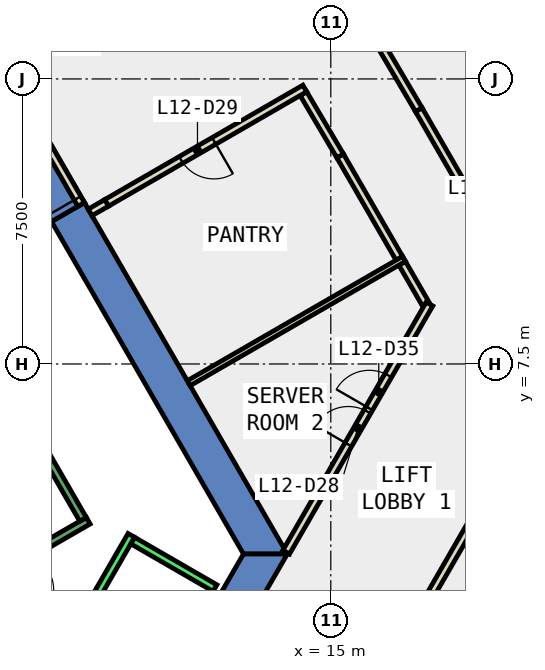
"""IFC4 building model, lengths in metres.
Left out: names, types, materials, properties, quantities, classifications, styles, units other than length and angle.
Written with IfcOpenShell. Run it as: python <this file> out.ifc"""

import sys

from ifc_helpers import new_model, si_unit, direction, frame, frame_2d, origin, place, context, subcontext, project, spatial, polyline, rectangle, outline, extrude, element, fill, save


model = new_model("IFC4")
c1 = context("Model", 3, precision=1e-05, world=origin(), true_north=direction((0.0, 1.0)))
c2 = subcontext(c1, "Body", "Model", "MODEL_VIEW")
j1 = project(units=[si_unit("LENGTHUNIT", "METRE"), si_unit("PLANEANGLEUNIT", "RADIAN")], contexts=[c1])
p1 = place(None, origin())
s1 = spatial("IfcSite", under=j1, at=p1, CompositionType="ELEMENT")
p2 = place(p1, origin())
s2 = spatial("IfcBuilding", under=s1, at=p2, CompositionType="ELEMENT")
p3 = place(p2, frame((0.0, 0.0, 60.2)))
s3 = spatial("IfcBuildingStorey", under=s2, at=p3, CompositionType="ELEMENT", Elevation=60.2)
p4 = place(p3, frame((0.0, 0.0, -0.4)))
e1 = element("IfcWall", 1, at=p4, inside=s3, PredefinedType="SHEAR", context=c2, shape_type="SweptSolid", body=[
    extrude(outline(polyline([(8.517, 11.748), (7.651, 11.248), (12.702, 2.5), (13.856, 2.5), (8.517, 11.748)])), origin(), (0.0, 0.0, 1.0), 4.2),
])
p5 = place(p3, frame((0.0, 0.0, 3.6)))
e2 = element("IfcWall", 2, at=p5, inside=s3, PredefinedType="SHEAR", context=c2, shape_type="SweptSolid", body=[
    extrude(outline(polyline([(7.517, 13.48), (6.651, 12.98), (7.651, 11.248), (8.517, 11.748), (7.517, 13.48)])), origin(), (0.0, 0.0, 1.0), 0.2),
])
p6 = place(p3, frame((0.0, 0.0, -0.4)))
e3 = element("IfcWall", 3, at=p6, inside=s3, PredefinedType="SHEAR", context=c2, shape_type="SweptSolid", body=[
    extrude(outline(polyline([(11.801, 0.94), (12.667, 0.44), (13.856, 2.5), (12.702, 2.5), (11.801, 0.94)])), origin(), (0.0, 0.0, 1.0), 4.2),
])
p7 = place(p3, frame((17.497, 9.078, 0.0), z_axis=(0.0, 0.0, 1.0), x_axis=(-0.500126451326, 0.865952384768, 0.0)))
e4 = element("IfcWall", 4, at=p7, inside=s3, PredefinedType="PARTITIONING", context=c2, shape_type="SweptSolid", body=[
    extrude(rectangle(XDim=1.238, YDim=0.2, at=frame_2d((0.619, 0.0))), origin(), (0.0, 0.0, 1.0), 3.8),
])
p8 = place(p3, frame((16.803, 10.28, 0.0), z_axis=(0.0, 0.0, 1.0), x_axis=(-0.499941881293, 0.866058956036, 0.0)))
e5 = element("IfcWall", 5, at=p8, inside=s3, PredefinedType="PARTITIONING", context=c2, shape_type="SweptSolid", body=[
    extrude(rectangle(XDim=3.114, YDim=0.2, at=frame_2d((1.557, 0.0))), origin(), (0.0, 0.0, 1.0), 3.8),
])
p9 = place(p3, frame((15.246, 12.977, 0.0), z_axis=(0.0, 0.0, 1.0), x_axis=(-0.508473864329, 0.861077423519, 0.0)))
e6 = element("IfcWall", 6, at=p9, inside=s3, PredefinedType="PARTITIONING", context=c2, shape_type="SweptSolid", body=[
    extrude(rectangle(XDim=1.9, YDim=0.2, at=frame_2d((0.95, 0.0))), origin(), (0.0, 0.0, 1.0), 3.8),
])
p10 = place(p3, frame((14.316, 14.75, 0.0), z_axis=(0.0, 0.0, 1.0), x_axis=(-0.865981716183, -0.500075661512, 0.0)))
e7 = element("IfcWall", 7, at=p10, inside=s3, PredefinedType="PARTITIONING", context=c2, shape_type="SweptSolid", body=[
    extrude(rectangle(XDim=6.023, YDim=0.2, at=frame_2d((3.011, 0.0))), origin(), (0.0, 0.0, 1.0), 3.8),
])
p11 = place(p10, frame((2.761, 0.0, 0.0)))
e8 = element("IfcOpeningElement", 8, at=p11, cuts=e7, PredefinedType="OPENING", context=c2, shape_type="SweptSolid", body=[
    extrude(rectangle(XDim=1.0, YDim=2.1, at=frame_2d((0.5, 1.05))), frame((0.0, 0.11, 0.0), z_axis=(0.0, -1.0, 0.0), x_axis=(1.0, 0.0, 0.0)), (0.0, 0.0, 1.0), 0.22),
])
p12 = place(p3, frame((15.512, 17.248, 0.0), z_axis=(0.0, 0.0, 1.0), x_axis=(0.508178415101, -0.861251820564, 0.0)))
e9 = element("IfcWall", 9, at=p12, inside=s3, PredefinedType="PARTITIONING", context=c2, shape_type="SweptSolid", body=[
    extrude(rectangle(XDim=3.554, YDim=0.2, at=frame_2d((1.777, 0.0))), origin(), (0.0, 0.0, 1.0), 3.8),
])
p13 = place(p3, frame((17.318, 14.187, 0.0), z_axis=(0.0, 0.0, 1.0), x_axis=(0.499986381413, -0.866033266336, 0.0)))
e10 = element("IfcWall", 10, at=p13, inside=s3, PredefinedType="PARTITIONING", context=c2, shape_type="SweptSolid", body=[
    extrude(rectangle(XDim=7.18, YDim=0.2, at=frame_2d((3.59, 0.0))), origin(), (0.0, 0.0, 1.0), 3.8),
])
p14 = place(p13, frame((3.165, 0.0, 0.0)))
e11 = element("IfcOpeningElement", 11, at=p14, cuts=e10, PredefinedType="OPENING", context=c2, shape_type="SweptSolid", body=[
    extrude(rectangle(XDim=1.0, YDim=2.1, at=frame_2d((0.5, 1.05))), frame((0.0, 0.11, 0.0), z_axis=(0.0, -1.0, 0.0), x_axis=(1.0, 0.0, 0.0)), (0.0, 0.0, 1.0), 0.22),
])
p15 = place(p3, frame((6.25, 1.894, 0.0), z_axis=(0.0, 0.0, 1.0), x_axis=(0.866043184279, -0.499969202016, 0.0)))
e12 = element("IfcWall", 12, at=p15, inside=s3, PredefinedType="PARTITIONING", context=c2, shape_type="SweptSolid", body=[
    extrude(rectangle(XDim=2.084, YDim=0.2, at=frame_2d((1.042, 0.0))), origin(), (0.0, 0.0, 1.0), 3.8),
])
p16 = place(p15, frame((0.642, 0.0, 0.0)))
e13 = element("IfcOpeningElement", 13, at=p16, cuts=e12, PredefinedType="OPENING", context=c2, shape_type="SweptSolid", body=[
    extrude(rectangle(XDim=0.9, YDim=2.1, at=frame_2d((0.45, 1.05))), frame((0.0, 0.11, 0.0), z_axis=(0.0, -1.0, 0.0), x_axis=(1.0, 0.0, 0.0)), (0.0, 0.0, 1.0), 0.22),
])
p17 = place(p3, frame((11.261, 6.994, 0.0), z_axis=(0.0, 0.0, 1.0), x_axis=(0.866043905515, 0.499967952693, 0.0)))
e14 = element("IfcWall", 14, at=p17, inside=s3, PredefinedType="PARTITIONING", context=c2, shape_type="SweptSolid", body=[
    extrude(rectangle(XDim=6.542, YDim=0.15, at=frame_2d((3.271, 0.0))), origin(), (0.0, 0.0, 1.0), 3.8),
])
p18 = place(p3, frame((13.827, 2.55, 0.0), z_axis=(0.0, 0.0, 1.0), x_axis=(0.500116794417, 0.865957961995, 0.0)))
e15 = element("IfcWall", 15, at=p18, inside=s3, PredefinedType="PARTITIONING", context=c2, shape_type="SweptSolid", body=[
    extrude(rectangle(XDim=7.538, YDim=0.2, at=frame_2d((3.769, 0.0))), origin(), (0.0, 0.0, 1.0), 3.8),
])
p19 = place(p18, frame((3.269, 0.0, 0.0)))
e16 = element("IfcOpeningElement", 16, at=p19, cuts=e15, PredefinedType="OPENING", context=c2, shape_type="SweptSolid", body=[
    extrude(rectangle(XDim=1.0, YDim=2.1, at=frame_2d((0.5, 1.05))), frame((0.0, 0.11, 0.0), z_axis=(0.0, -1.0, 0.0), x_axis=(1.0, 0.0, 0.0)), (0.0, 0.0, 1.0), 0.22),
])
p20 = place(p18, frame((4.369, 0.0, 0.0)))
e17 = element("IfcOpeningElement", 17, at=p20, cuts=e15, PredefinedType="OPENING", context=c2, shape_type="SweptSolid", body=[
    extrude(rectangle(XDim=1.0, YDim=2.1, at=frame_2d((0.5, 1.05))), frame((0.0, 0.11, 0.0), z_axis=(0.0, -1.0, 0.0), x_axis=(1.0, 0.0, 0.0)), (0.0, 0.0, 1.0), 0.22),
])
p21 = place(p3, frame((19.81, 5.211, 0.0), z_axis=(0.0, 0.0, 1.0), x_axis=(-0.500003368273, -0.866023459102, 0.0)))
e18 = element("IfcWall", 18, at=p21, inside=s3, PredefinedType="PARTITIONING", context=c2, shape_type="SweptSolid", body=[
    extrude(rectangle(XDim=14.018, YDim=0.2, at=frame_2d((7.009, 0.0))), origin(), (0.0, 0.0, 1.0), 3.8),
])
p22 = place(p3, frame((8.43, 11.698, 0.0), z_axis=(0.0, 0.0, 1.0), x_axis=(-0.50002537861, 0.866010750942, 0.0)))
e19 = element("IfcWall", 19, at=p22, inside=s3, PredefinedType="PARTITIONING", context=c2, shape_type="SweptSolid", body=[
    extrude(rectangle(XDim=2.0, YDim=0.2, at=frame_2d((1.0, 0.0))), origin(), (0.0, 0.0, 1.0), 2.4),
])
p23 = place(p22, frame((0.19, 0.0, 0.0)))
e20 = element("IfcOpeningElement", 20, at=p23, cuts=e19, PredefinedType="OPENING", context=c2, shape_type="SweptSolid", body=[
    extrude(rectangle(XDim=1.8, YDim=2.1, at=frame_2d((0.9, 1.05))), frame((0.0, 0.11, 0.0), z_axis=(0.0, -1.0, 0.0), x_axis=(1.0, 0.0, 0.0)), (0.0, 0.0, 1.0), 0.22),
])
p24 = place(p3, frame((9.1, 11.738, 0.0), z_axis=(0.0, 0.0, 1.0), x_axis=(-0.866071776036, -0.499919672301, 0.0)))
e21 = element("IfcWall", 21, at=p24, inside=s3, PredefinedType="PARTITIONING", context=c2, shape_type="SweptSolid", body=[
    extrude(rectangle(XDim=0.5, YDim=0.2, at=frame_2d((0.25, 0.0))), origin(), (0.0, 0.0, 1.0), 2.4),
])
p25 = place(p3, frame((4.451, -6.19, 0.0), z_axis=(0.0, 0.0, 1.0), x_axis=(0.50000090737, 0.866024879913, 0.0)))
e22 = element("IfcWall", 22, at=p25, inside=s3, PredefinedType="STANDARD", context=c2, shape_type="SweptSolid", body=[
    extrude(rectangle(XDim=10.6, YDim=0.2, at=frame_2d((5.3, 0.0))), origin(), (0.0, 0.0, 1.0), 3.8),
])
p26 = place(p3, frame((9.788, 2.853, 0.0), z_axis=(0.0, 0.0, 1.0), x_axis=(0.865998541277, -0.500046524342, 0.0)))
e23 = element("IfcWall", 23, at=p26, inside=s3, PredefinedType="STANDARD", context=c2, shape_type="SweptSolid", body=[
    extrude(rectangle(XDim=2.5, YDim=0.2, at=frame_2d((1.25, 0.0))), origin(), (0.0, 0.0, 1.0), 3.8),
])
p27 = place(p3, frame((4.806, 1.176, 0.0), z_axis=(0.0, 0.0, 1.0), x_axis=(0.866059941101, 0.499940174841, 0.0)))
e24 = element("IfcWall", 24, at=p27, inside=s3, PredefinedType="STANDARD", context=c2, shape_type="SweptSolid", body=[
    extrude(rectangle(XDim=4.4, YDim=0.2, at=frame_2d((2.2, 0.0))), origin(), (0.0, 0.0, 1.0), 3.8),
])
p28 = place(p27, frame((1.65, 0.0, 0.0)))
e25 = element("IfcOpeningElement", 25, at=p28, cuts=e24, PredefinedType="OPENING", context=c2, shape_type="SweptSolid", body=[
    extrude(rectangle(XDim=1.1, YDim=2.2, at=frame_2d((0.55, 1.1))), frame((0.0, 0.11, 0.0), z_axis=(0.0, -1.0, 0.0), x_axis=(1.0, 0.0, 0.0)), (0.0, 0.0, 1.0), 0.22),
])
p29 = place(p3, frame((8.48, 3.412, 0.0), z_axis=(0.0, 0.0, 1.0), x_axis=(-0.499978703459, 0.866037698999, 0.0)))
e26 = element("IfcWall", 26, at=p29, inside=s3, PredefinedType="STANDARD", context=c2, shape_type="SweptSolid", body=[
    extrude(rectangle(XDim=6.9, YDim=0.2, at=frame_2d((3.45, 0.0))), origin(), (0.0, 0.0, 1.0), 3.8),
])
p30 = place(p19, origin())
e27 = element("IfcDoor", 27, at=p30, inside=s3, OperationType="SINGLE_SWING_LEFT", PredefinedType="DOOR", context=c2, shape_type="SweptSolid", body=[
    extrude(rectangle(XDim=1.0, YDim=2.1, at=frame_2d((0.5, 1.05))), frame((0.0, 0.025, 0.0), z_axis=(0.0, -1.0, 0.0), x_axis=(1.0, 0.0, 0.0)), (0.0, 0.0, 1.0), 0.05),
])
fill(e16, e27)
p31 = place(p11, origin())
e28 = element("IfcDoor", 28, at=p31, inside=s3, OperationType="SINGLE_SWING_LEFT", PredefinedType="DOOR", context=c2, shape_type="SweptSolid", body=[
    extrude(rectangle(XDim=1.0, YDim=2.1, at=frame_2d((0.5, 1.05))), frame((0.0, 0.025, 0.0), z_axis=(0.0, -1.0, 0.0), x_axis=(1.0, 0.0, 0.0)), (0.0, 0.0, 1.0), 0.05),
])
fill(e8, e28)
p32 = place(p20, origin())
e29 = element("IfcDoor", 29, at=p32, inside=s3, OperationType="SINGLE_SWING_RIGHT", PredefinedType="DOOR", context=c2, shape_type="SweptSolid", body=[
    extrude(rectangle(XDim=1.0, YDim=2.1, at=frame_2d((0.5, 1.05))), frame((0.0, 0.025, 0.0), z_axis=(0.0, -1.0, 0.0), x_axis=(1.0, 0.0, 0.0)), (0.0, 0.0, 1.0), 0.05),
])
fill(e17, e29)
p33 = place(p23, origin())
e30 = element("IfcDoor", 30, at=p33, inside=s3, OperationType="DOUBLE_DOOR_SINGLE_SWING", PredefinedType="DOOR", context=c2, shape_type="SweptSolid", body=[
    extrude(rectangle(XDim=1.8, YDim=2.1, at=frame_2d((0.9, 1.05))), frame((0.0, 0.025, 0.0), z_axis=(0.0, -1.0, 0.0), x_axis=(1.0, 0.0, 0.0)), (0.0, 0.0, 1.0), 0.05),
])
fill(e20, e30)
save(model, sys.argv[1])
